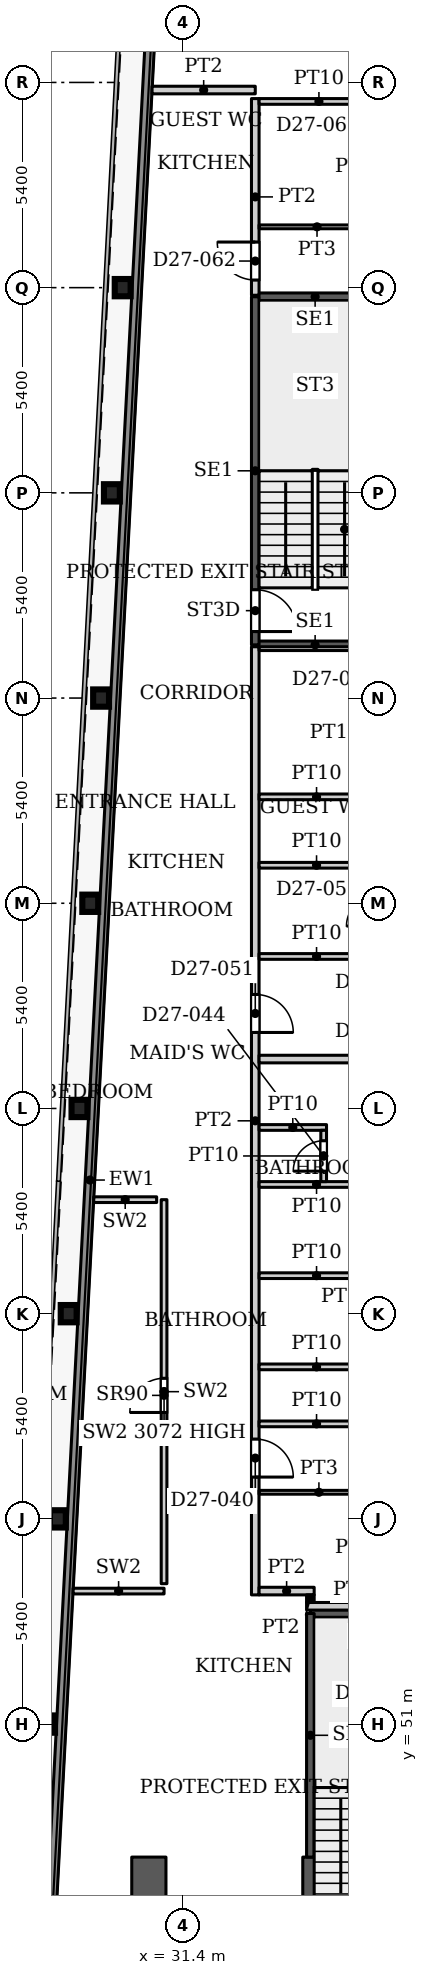
"""IFC4 building model, lengths in metres.
Left out: names, types, materials, properties, quantities, classifications, styles, units other than length and angle.
Written with IfcOpenShell. Run it as: python <this file> out.ifc"""

import sys

from ifc_helpers import new_model, si_unit, direction, frame, frame_2d, origin, origin_2d, place, context, subcontext, project, spatial, rectangle, i_section, extrude, source, transform, mapped, element, fill, save


model = new_model("IFC4")
c1 = context("Model", 3, precision=1e-05, world=origin(), true_north=direction((0.0, 1.0)))
c2 = subcontext(c1, "Body", "Model", "MODEL_VIEW")
j1 = project(units=[si_unit("LENGTHUNIT", "METRE"), si_unit("PLANEANGLEUNIT", "RADIAN")], contexts=[c1])
p1 = place(None, origin())
s1 = spatial("IfcSite", under=j1, at=p1, CompositionType="ELEMENT")
p2 = place(p1, origin())
s2 = spatial("IfcBuilding", under=s1, at=p2, CompositionType="ELEMENT")
p3 = place(p2, frame((0.0, 0.0, 117.5)))
s3 = spatial("IfcBuildingStorey", under=s2, at=p3, CompositionType="ELEMENT", Elevation=117.5)
for number, where, z_axis, x_axis in (
    (1, (27.822, 51.0, 0.0), (0.0, 0.0, 1.0), (1.0, 0.0, 0.0)),
    (2, (28.106, 56.4, 0.0), (0.0, 0.0, 1.0), (1.0, 0.0, 0.0)),
    (3, (28.39, 61.8, 0.0), (0.0, 0.0, 1.0), (1.0, 0.0, 0.0)),
    (4, (28.674, 67.2, 0.0), (0.0, 0.0, 1.0), (1.0, 0.0, 0.0)),
    (5, (28.958, 72.6, 0.0), (0.0, 0.0, 1.0), (1.0, 0.0, 0.0)),
    (6, (29.243, 78.0, 0.0), (0.0, 0.0, 1.0), (1.0, 0.0, 0.0)),
    (7, (29.527, 83.4, 0.0), (0.0, 0.0, 1.0), (1.0, 0.0, 0.0)),
    (8, (29.811, 88.8, 0.0), (0.0, 0.0, 1.0), (1.0, 0.0, 0.0)),
):
    element("IfcColumn", number, at=place(p3, frame(where, z_axis=z_axis, x_axis=x_axis)), inside=s3, PredefinedType="COLUMN", context=c2, shape_type="SweptSolid", body=[
        extrude(i_section(OverallWidth=0.418, OverallDepth=0.455, WebThickness=0.042, FlangeThickness=0.068, FilletRadius=0.014, at=origin_2d()), origin(), (0.0, 0.0, 1.0), 3.9),
    ])
p4 = place(p3, frame((34.75, 29.05, 0.0), z_axis=(0.0, 0.0, 1.0), x_axis=(0.0, 1.0, 0.0)))
e9 = element("IfcWall", 9, at=p4, inside=s3, PredefinedType="SHEAR", context=c2, shape_type="SweptSolid", body=[
    extrude(rectangle(XDim=18.45, YDim=0.4, at=frame_2d((9.225, 0.0))), origin(), (0.0, 0.0, 1.0), 3.9),
])
p5 = place(p4, frame((8.025, 0.0, 0.0)))
e10 = element("IfcOpeningElement", 10, at=p5, cuts=e9, PredefinedType="OPENING", context=c2, shape_type="SweptSolid", body=[
    extrude(rectangle(XDim=1.1, YDim=2.2, at=frame_2d((0.55, 1.1))), frame((0.0, 0.21, 0.0), z_axis=(0.0, -1.0, 0.0), x_axis=(1.0, 0.0, 0.0)), (0.0, 0.0, 1.0), 0.42),
])
p6 = place(p4, frame((10.875, 0.0, 0.0)))
e11 = element("IfcOpeningElement", 11, at=p6, cuts=e9, PredefinedType="OPENING", context=c2, shape_type="SweptSolid", body=[
    extrude(rectangle(XDim=1.1, YDim=2.2, at=frame_2d((0.55, 1.1))), frame((0.0, 0.21, 0.0), z_axis=(0.0, -1.0, 0.0), x_axis=(1.0, 0.0, 0.0)), (0.0, 0.0, 1.0), 0.42),
])
p7 = place(p4, frame((13.725, 0.0, 0.0)))
e12 = element("IfcOpeningElement", 12, at=p7, cuts=e9, PredefinedType="OPENING", context=c2, shape_type="SweptSolid", body=[
    extrude(rectangle(XDim=1.1, YDim=2.2, at=frame_2d((0.55, 1.1))), frame((0.0, 0.21, 0.0), z_axis=(0.0, -1.0, 0.0), x_axis=(1.0, 0.0, 0.0)), (0.0, 0.0, 1.0), 0.42),
])
p8 = place(p4, frame((15.95, 0.0, 0.0)))
e13 = element("IfcOpeningElement", 13, at=p8, cuts=e9, PredefinedType="OPENING", context=c2, shape_type="SweptSolid", body=[
    extrude(rectangle(XDim=1.1, YDim=2.2, at=frame_2d((0.55, 1.1))), frame((0.0, 0.21, 0.0), z_axis=(0.0, -1.0, 0.0), x_axis=(1.0, 0.0, 0.0)), (0.0, 0.0, 1.0), 0.42),
])
p9 = place(p3, frame((30.5, 29.05, 0.0), z_axis=(0.0, 0.0, 1.0), x_axis=(0.0, 1.0, 0.0)))
e14 = element("IfcWall", 14, at=p9, inside=s3, PredefinedType="SHEAR", context=c2, shape_type="SweptSolid", body=[
    extrude(rectangle(XDim=18.45, YDim=0.9, at=frame_2d((9.225, 0.0))), origin(), (0.0, 0.0, 1.0), 3.9),
])
p10 = place(p9, frame((6.55, 0.0, 0.0)))
e15 = element("IfcOpeningElement", 15, at=p10, cuts=e14, PredefinedType="OPENING", context=c2, shape_type="SweptSolid", body=[
    extrude(rectangle(XDim=0.9, YDim=2.2, at=frame_2d((0.45, 1.1))), frame((0.0, 0.46, 0.0), z_axis=(0.0, -1.0, 0.0), x_axis=(1.0, 0.0, 0.0)), (0.0, 0.0, 1.0), 0.92),
])
p11 = place(p9, frame((11.025, 0.0, 0.0)))
e16 = element("IfcOpeningElement", 16, at=p11, cuts=e14, PredefinedType="OPENING", context=c2, shape_type="SweptSolid", body=[
    extrude(rectangle(XDim=0.9, YDim=2.2, at=frame_2d((0.45, 1.1))), frame((0.0, 0.46, 0.0), z_axis=(0.0, -1.0, 0.0), x_axis=(1.0, 0.0, 0.0)), (0.0, 0.0, 1.0), 0.92),
])
p12 = place(p3, frame((27.195, 31.969, 0.0), z_axis=(0.0, 0.0, 1.0), x_axis=(0.052554995867, 0.998618031286, 0.0)))
e17 = element("IfcWall", 17, at=p12, inside=s3, PredefinedType="SOLIDWALL", context=c2, shape_type="SweptSolid", body=[
    extrude(rectangle(XDim=66.787, YDim=0.25, at=frame_2d((33.394, 0.0))), origin(), (0.0, 0.0, 1.0), 3.75),
])
p13 = place(p3, frame((34.75, 53.91, 0.0), z_axis=(0.0, 0.0, 1.0), x_axis=(1.0, 0.0, 0.0)))
e18 = element("IfcWall", 18, at=p13, inside=s3, PredefinedType="SHEAR", context=c2, shape_type="SweptSolid", body=[
    extrude(rectangle(XDim=3.15, YDim=0.2, at=frame_2d((1.575, 0.0))), origin(), (0.0, 0.0, 1.0), 3.9),
])
p14 = place(p3, frame((34.75, 47.5, 0.0), z_axis=(0.0, 0.0, 1.0), x_axis=(0.0, 1.0, 0.0)))
e19 = element("IfcWall", 19, at=p14, inside=s3, PredefinedType="SHEAR", context=c2, shape_type="SweptSolid", body=[
    extrude(rectangle(XDim=6.41, YDim=0.2, at=frame_2d((3.205, 0.0))), origin(), (0.0, 0.0, 1.0), 3.9),
])
for number, where, z_axis, x_axis in (
    (20, (33.3, 79.4, 0.0), (0.0, 0.0, 1.0), (1.0, 0.0, 0.0)),
    (21, (33.3, 88.56, 0.0), (0.0, 0.0, 1.0), (1.0, 0.0, 0.0)),
):
    element("IfcWall", number, at=place(p3, frame(where, z_axis=z_axis, x_axis=x_axis)), inside=s3, PredefinedType="SHEAR", context=c2, shape_type="SweptSolid", body=[
        extrude(rectangle(XDim=3.15, YDim=0.2, at=frame_2d((1.575, 0.0))), origin(), (0.0, 0.0, 1.0), 3.9),
    ])
p15 = place(p3, frame((33.3, 79.4, 0.0), z_axis=(0.0, 0.0, 1.0), x_axis=(0.0, 1.0, 0.0)))
e22 = element("IfcWall", 22, at=p15, inside=s3, PredefinedType="SHEAR", context=c2, shape_type="SweptSolid", body=[
    extrude(rectangle(XDim=9.16, YDim=0.2, at=frame_2d((4.58, 0.0))), origin(), (0.0, 0.0, 1.0), 3.9),
])
p16 = place(p15, frame((0.35, 0.0, 0.0)))
e23 = element("IfcOpeningElement", 23, at=p16, cuts=e22, PredefinedType="OPENING", context=c2, shape_type="SweptSolid", body=[
    extrude(rectangle(XDim=1.1, YDim=2.2, at=frame_2d((0.55, 1.1))), frame((0.0, 0.11, 0.0), z_axis=(0.0, -1.0, 0.0), x_axis=(1.0, 0.0, 0.0)), (0.0, 0.0, 1.0), 0.22),
])
p17 = place(p3, frame((28.508, 54.5, 0.0), z_axis=(0.0, 0.0, 1.0), x_axis=(1.0, 0.0, 0.0)))
e24 = element("IfcWall", 24, at=p17, inside=s3, PredefinedType="PARTITIONING", context=c2, shape_type="SweptSolid", body=[
    extrude(rectangle(XDim=2.392, YDim=0.15, at=frame_2d((1.196, 0.0))), origin(), (0.0, 0.0, 1.0), 3.9),
])
p18 = place(p3, frame((30.9, 54.695, 0.0), z_axis=(0.0, 0.0, 1.0), x_axis=(0.0, 1.0, 0.0)))
e25 = element("IfcWall", 25, at=p18, inside=s3, PredefinedType="PARTITIONING", context=c2, shape_type="SweptSolid", body=[
    extrude(rectangle(XDim=10.105, YDim=0.15, at=frame_2d((5.052, 0.0))), origin(), (0.0, 0.0, 1.0), 3.072),
])
p19 = place(p18, frame((4.505, 0.0, 0.0)))
e26 = element("IfcOpeningElement", 26, at=p19, cuts=e25, PredefinedType="OPENING", context=c2, shape_type="SweptSolid", body=[
    extrude(rectangle(XDim=0.9, YDim=2.2, at=frame_2d((0.45, 1.1))), frame((0.0, 0.085, 0.0), z_axis=(0.0, -1.0, 0.0), x_axis=(1.0, 0.0, 0.0)), (0.0, 0.0, 1.0), 0.17),
])
p20 = place(p3, frame((29.05, 64.8, 0.0), z_axis=(0.0, 0.0, 1.0), x_axis=(1.0, 0.0, 0.0)))
e27 = element("IfcWall", 27, at=p20, inside=s3, PredefinedType="PARTITIONING", context=c2, shape_type="SweptSolid", body=[
    extrude(rectangle(XDim=1.655, YDim=0.15, at=frame_2d((0.828, 0.0))), origin(), (0.0, 0.0, 1.0), 3.9),
])
p21 = place(p3, frame((30.585, 94.0, 0.0), z_axis=(0.0, 0.0, 1.0), x_axis=(1.0, 0.0, 0.0)))
e28 = element("IfcWall", 28, at=p21, inside=s3, PredefinedType="PARTITIONING", context=c2, shape_type="SweptSolid", body=[
    extrude(rectangle(XDim=2.715, YDim=0.2, at=frame_2d((1.358, 0.0))), origin(), (0.0, 0.0, 1.0), 3.6),
])
p22 = place(p3, frame((33.3, 54.4, 0.0), z_axis=(0.0, 0.0, 1.0), x_axis=(0.0, 1.0, 0.0)))
e29 = element("IfcWall", 29, at=p22, inside=s3, PredefinedType="PARTITIONING", context=c2, shape_type="SweptSolid", body=[
    extrude(rectangle(XDim=24.95, YDim=0.2, at=frame_2d((12.475, 0.0))), origin(), (0.0, 0.0, 1.0), 3.6),
])
p23 = place(p22, frame((3.1, 0.0, 0.0)))
e30 = element("IfcOpeningElement", 30, at=p23, cuts=e29, PredefinedType="OPENING", context=c2, shape_type="SweptSolid", body=[
    extrude(rectangle(XDim=1.0, YDim=2.1, at=frame_2d((0.5, 1.05))), frame((0.0, 0.11, 0.0), z_axis=(0.0, -1.0, 0.0), x_axis=(1.0, 0.0, 0.0)), (0.0, 0.0, 1.0), 0.22),
])
p24 = place(p22, frame((14.8, 0.0, 0.0)))
e31 = element("IfcOpeningElement", 31, at=p24, cuts=e29, PredefinedType="OPENING", context=c2, shape_type="SweptSolid", body=[
    extrude(rectangle(XDim=1.0, YDim=2.1, at=frame_2d((0.5, 1.05))), frame((0.0, 0.11, 0.0), z_axis=(0.0, -1.0, 0.0), x_axis=(1.0, 0.0, 0.0)), (0.0, 0.0, 1.0), 0.22),
])
p25 = place(p3, frame((33.3, 88.6, 0.0), z_axis=(0.0, 0.0, 1.0), x_axis=(0.0, 1.0, 0.0)))
e32 = element("IfcWall", 32, at=p25, inside=s3, PredefinedType="PARTITIONING", context=c2, shape_type="SweptSolid", body=[
    extrude(rectangle(XDim=5.175, YDim=0.2, at=frame_2d((2.587, 0.0))), origin(), (0.0, 0.0, 1.0), 3.6),
])
p26 = place(p25, frame((0.4, 0.0, 0.0)))
e33 = element("IfcOpeningElement", 33, at=p26, cuts=e32, PredefinedType="OPENING", context=c2, shape_type="SweptSolid", body=[
    extrude(rectangle(XDim=1.0, YDim=2.1, at=frame_2d((0.5, 1.05))), frame((0.0, 0.11, 0.0), z_axis=(0.0, -1.0, 0.0), x_axis=(1.0, 0.0, 0.0)), (0.0, 0.0, 1.0), 0.22),
])
p27 = place(p3, frame((33.4, 54.5, 0.0), z_axis=(0.0, 0.0, 1.0), x_axis=(1.0, 0.0, 0.0)))
e34 = element("IfcWall", 34, at=p27, inside=s3, PredefinedType="PARTITIONING", context=c2, shape_type="SweptSolid", body=[
    extrude(rectangle(XDim=1.45, YDim=0.2, at=frame_2d((0.725, 0.0))), origin(), (0.0, 0.0, 1.0), 3.6),
])
p28 = place(p3, frame((33.4, 57.1, 0.0), z_axis=(0.0, 0.0, 1.0), x_axis=(1.0, 0.0, 0.0)))
e35 = element("IfcWall", 35, at=p28, inside=s3, PredefinedType="PARTITIONING", context=c2, shape_type="SweptSolid", body=[
    extrude(rectangle(XDim=3.15, YDim=0.1, at=frame_2d((1.575, 0.0))), origin(), (0.0, 0.0, 1.0), 3.6),
])
for number, where, z_axis, x_axis in (
    (36, (33.4, 58.9, 0.0), (0.0, 0.0, 1.0), (1.0, 0.0, 0.0)),
    (37, (33.4, 60.4, 0.0), (0.0, 0.0, 1.0), (1.0, 0.0, 0.0)),
    (38, (33.4, 62.8, 0.0), (0.0, 0.0, 1.0), (1.0, 0.0, 0.0)),
    (39, (33.4, 65.2, 0.0), (0.0, 0.0, 1.0), (1.0, 0.0, 0.0)),
):
    element("IfcWall", number, at=place(p3, frame(where, z_axis=z_axis, x_axis=x_axis)), inside=s3, PredefinedType="PARTITIONING", context=c2, shape_type="SweptSolid", body=[
        extrude(rectangle(XDim=3.025, YDim=0.15, at=frame_2d((1.513, 0.0))), origin(), (0.0, 0.0, 1.0), 3.6),
    ])
p29 = place(p3, frame((33.4, 66.7, 0.0), z_axis=(0.0, 0.0, 1.0), x_axis=(1.0, 0.0, 0.0)))
e40 = element("IfcWall", 40, at=p29, inside=s3, PredefinedType="PARTITIONING", context=c2, shape_type="SweptSolid", body=[
    extrude(rectangle(XDim=1.775, YDim=0.15, at=frame_2d((0.888, 0.0))), origin(), (0.0, 0.0, 1.0), 3.6),
])
p30 = place(p3, frame((33.4, 68.5, 0.0), z_axis=(0.0, 0.0, 1.0), x_axis=(1.0, 0.0, 0.0)))
e41 = element("IfcWall", 41, at=p30, inside=s3, PredefinedType="PARTITIONING", context=c2, shape_type="SweptSolid", body=[
    extrude(rectangle(XDim=12.5, YDim=0.2, at=frame_2d((6.25, 0.0))), origin(), (0.0, 0.0, 1.0), 3.6),
])
for number, where, z_axis, x_axis in (
    (42, (33.4, 71.2, 0.0), (0.0, 0.0, 1.0), (1.0, 0.0, 0.0)),
    (43, (33.4, 73.6, 0.0), (0.0, 0.0, 1.0), (1.0, 0.0, 0.0)),
    (44, (33.4, 75.4, 0.0), (0.0, 0.0, 1.0), (1.0, 0.0, 0.0)),
):
    element("IfcWall", number, at=place(p3, frame(where, z_axis=z_axis, x_axis=x_axis)), inside=s3, PredefinedType="PARTITIONING", context=c2, shape_type="SweptSolid", body=[
        extrude(rectangle(XDim=3.025, YDim=0.15, at=frame_2d((1.513, 0.0))), origin(), (0.0, 0.0, 1.0), 3.6),
    ])
p31 = place(p3, frame((33.4, 79.3, 0.0), z_axis=(0.0, 0.0, 1.0), x_axis=(1.0, 0.0, 0.0)))
e45 = element("IfcWall", 45, at=p31, inside=s3, PredefinedType="PARTITIONING", context=c2, shape_type="SweptSolid", body=[
    extrude(rectangle(XDim=12.5, YDim=0.1, at=frame_2d((6.25, 0.0))), origin(), (0.0, 0.0, 1.0), 3.6),
])
p32 = place(p31, frame((3.355, 0.0, 0.0)))
e46 = element("IfcOpeningElement", 46, at=p32, cuts=e45, PredefinedType="OPENING", context=c2, shape_type="SweptSolid", body=[
    extrude(rectangle(XDim=0.9, YDim=2.1, at=frame_2d((0.45, 1.05))), frame((0.0, 0.06, 0.0), z_axis=(0.0, -1.0, 0.0), x_axis=(1.0, 0.0, 0.0)), (0.0, 0.0, 1.0), 0.12),
])
p33 = place(p3, frame((33.4, 90.4, 0.0), z_axis=(0.0, 0.0, 1.0), x_axis=(1.0, 0.0, 0.0)))
e47 = element("IfcWall", 47, at=p33, inside=s3, PredefinedType="PARTITIONING", context=c2, shape_type="SweptSolid", body=[
    extrude(rectangle(XDim=3.05, YDim=0.1, at=frame_2d((1.525, 0.0))), origin(), (0.0, 0.0, 1.0), 3.6),
])
p34 = place(p3, frame((33.4, 93.7, 0.0), z_axis=(0.0, 0.0, 1.0), x_axis=(1.0, 0.0, 0.0)))
e48 = element("IfcWall", 48, at=p34, inside=s3, PredefinedType="PARTITIONING", context=c2, shape_type="SweptSolid", body=[
    extrude(rectangle(XDim=3.15, YDim=0.15, at=frame_2d((1.575, 0.0))), origin(), (0.0, 0.0, 1.0), 3.6),
])
p35 = place(p3, frame((34.65, 54.1, 0.0), z_axis=(0.0, 0.0, 1.0), x_axis=(1.0, 0.0, 0.0)))
e49 = element("IfcWall", 49, at=p35, inside=s3, PredefinedType="PARTITIONING", context=c2, shape_type="SweptSolid", body=[
    extrude(rectangle(XDim=3.25, YDim=0.2, at=frame_2d((1.625, 0.0))), origin(), (0.0, 0.0, 1.0), 3.6),
])
p36 = place(p3, frame((34.75, 54.2, 0.0), z_axis=(0.0, 0.0, 1.0), x_axis=(0.0, 1.0, 0.0)))
e50 = element("IfcWall", 50, at=p36, inside=s3, PredefinedType="PARTITIONING", context=c2, shape_type="SweptSolid", body=[
    extrude(rectangle(XDim=0.2, YDim=0.2, at=frame_2d((0.1, 0.0))), origin(), (0.0, 0.0, 1.0), 3.6),
])
p37 = place(p3, frame((35.1, 65.275, 0.0), z_axis=(0.0, 0.0, 1.0), x_axis=(0.0, 1.0, 0.0)))
e51 = element("IfcWall", 51, at=p37, inside=s3, PredefinedType="PARTITIONING", context=c2, shape_type="SweptSolid", body=[
    extrude(rectangle(XDim=1.35, YDim=0.15, at=frame_2d((0.675, 0.0))), origin(), (0.0, 0.0, 1.0), 3.6),
])
p38 = place(p37, frame((0.275, 0.0, 0.0)))
e52 = element("IfcOpeningElement", 52, at=p38, cuts=e51, PredefinedType="OPENING", context=c2, shape_type="SweptSolid", body=[
    extrude(rectangle(XDim=0.8, YDim=2.1, at=frame_2d((0.4, 1.05))), frame((0.0, 0.085, 0.0), z_axis=(0.0, -1.0, 0.0), x_axis=(1.0, 0.0, 0.0)), (0.0, 0.0, 1.0), 0.17),
])
m1 = source(origin(), c2, "Body", "SweptSolid", [
    extrude(rectangle(XDim=0.9, YDim=2.2, at=frame_2d((0.45, 1.1))), frame((0.0, 0.025, 0.0), z_axis=(0.0, -1.0, 0.0), x_axis=(1.0, 0.0, 0.0)), (0.0, 0.0, 1.0), 0.05),
])
p39 = place(p19, origin())
e53 = element("IfcDoor", 53, at=p39, inside=s3, OperationType="SINGLE_SWING_LEFT", PredefinedType="DOOR", context=c2, shape_type="MappedRepresentation", body=[
    mapped(m1, transform((0.0, 0.0, 0.0), x_axis=(1.0, 0.0, 0.0), y_axis=(0.0, 1.0, 0.0), z_axis=(0.0, 0.0, 1.0), scale=1.0)),
])
fill(e26, e53)
m2 = source(origin(), c2, "Body", "SweptSolid", [
    extrude(rectangle(XDim=1.1, YDim=2.2, at=frame_2d((0.55, 1.1))), frame((0.0, 0.025, 0.0), z_axis=(0.0, -1.0, 0.0), x_axis=(1.0, 0.0, 0.0)), (0.0, 0.0, 1.0), 0.05),
])
p40 = place(p16, origin())
e54 = element("IfcDoor", 54, at=p40, inside=s3, OperationType="SINGLE_SWING_RIGHT", PredefinedType="DOOR", context=c2, shape_type="MappedRepresentation", body=[
    mapped(m2, transform((0.0, 0.0, 0.0), x_axis=(1.0, 0.0, 0.0), y_axis=(0.0, 1.0, 0.0), z_axis=(0.0, 0.0, 1.0), scale=1.0)),
])
fill(e23, e54)
m3 = source(origin(), c2, "Body", "SweptSolid", [
    extrude(rectangle(XDim=1.0, YDim=2.1, at=frame_2d((0.5, 1.05))), frame((0.0, 0.025, 0.0), z_axis=(0.0, -1.0, 0.0), x_axis=(1.0, 0.0, 0.0)), (0.0, 0.0, 1.0), 0.05),
])
p41 = place(p23, origin())
e55 = element("IfcDoor", 55, at=p41, inside=s3, OperationType="SINGLE_SWING_RIGHT", PredefinedType="DOOR", context=c2, shape_type="MappedRepresentation", body=[
    mapped(m3, transform((0.0, 0.0, 0.0), x_axis=(1.0, 0.0, 0.0), y_axis=(0.0, 1.0, 0.0), z_axis=(0.0, 0.0, 1.0), scale=1.0)),
])
fill(e30, e55)
m4 = source(origin(), c2, "Body", "SweptSolid", [
    extrude(rectangle(XDim=0.8, YDim=2.1, at=frame_2d((0.4, 1.05))), frame((0.0, 0.025, 0.0), z_axis=(0.0, -1.0, 0.0), x_axis=(1.0, 0.0, 0.0)), (0.0, 0.0, 1.0), 0.05),
])
p42 = place(p38, origin())
e56 = element("IfcDoor", 56, at=p42, inside=s3, OperationType="SINGLE_SWING_LEFT", PredefinedType="DOOR", context=c2, shape_type="MappedRepresentation", body=[
    mapped(m4, transform((0.0, 0.0, 0.0), x_axis=(1.0, 0.0, 0.0), y_axis=(0.0, 1.0, 0.0), z_axis=(0.0, 0.0, 1.0), scale=1.0)),
])
fill(e52, e56)
p43 = place(p24, origin())
e57 = element("IfcDoor", 57, at=p43, inside=s3, OperationType="SINGLE_SWING_RIGHT", PredefinedType="DOOR", context=c2, shape_type="MappedRepresentation", body=[
    mapped(m3, transform((0.0, 0.0, 0.0), x_axis=(1.0, 0.0, 0.0), y_axis=(0.0, 1.0, 0.0), z_axis=(0.0, 0.0, 1.0), scale=1.0)),
])
fill(e31, e57)
p44 = place(p26, origin())
e58 = element("IfcDoor", 58, at=p44, inside=s3, OperationType="SINGLE_SWING_LEFT", PredefinedType="DOOR", context=c2, shape_type="MappedRepresentation", body=[
    mapped(m3, transform((0.0, 0.0, 0.0), x_axis=(1.0, 0.0, 0.0), y_axis=(0.0, 1.0, 0.0), z_axis=(0.0, 0.0, 1.0), scale=1.0)),
])
fill(e33, e58)
save(model, sys.argv[1])
